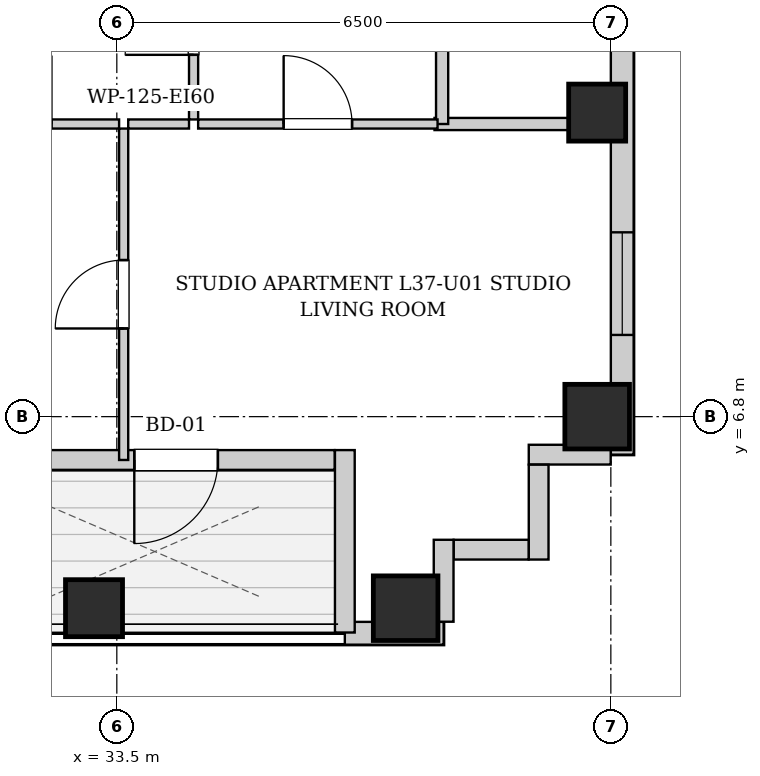
"""IFC4 building model, lengths in metres.
Left out: names, types, materials, properties, quantities, classifications, styles, units other than length and angle.
Written with IfcOpenShell. Run it as: python <this file> out.ifc"""

import sys

from ifc_helpers import new_model, si_unit, direction, frame, frame_2d, origin, origin_2d, place, context, subcontext, project, spatial, rectangle, extrude, element, fill, save


model = new_model("IFC4")
c1 = context("Model", 3, precision=1e-05, world=origin(), true_north=direction((0.0, 1.0)))
c2 = subcontext(c1, "Body", "Model", "MODEL_VIEW")
j1 = project(units=[si_unit("LENGTHUNIT", "METRE"), si_unit("PLANEANGLEUNIT", "RADIAN")], contexts=[c1])
p1 = place(None, origin())
s1 = spatial("IfcSite", under=j1, at=p1, CompositionType="ELEMENT")
p2 = place(p1, origin())
s2 = spatial("IfcBuilding", under=s1, at=p2, CompositionType="ELEMENT")
p3 = place(p2, frame((0.0, 0.0, 130.9)))
s3 = spatial("IfcBuildingStorey", under=s2, at=p3, CompositionType="ELEMENT", Elevation=130.9)
p4 = place(p3, frame((33.2, 4.28, 0.0), z_axis=(0.0, 0.0, 1.0), x_axis=(1.0, 0.0, 0.0)))
e1 = element("IfcColumn", 1, at=p4, inside=s3, PredefinedType="COLUMN", context=c2, shape_type="SweptSolid", body=[
    extrude(rectangle(XDim=0.75, YDim=0.75, at=origin_2d()), origin(), (0.0, 0.0, 1.0), 3.25),
])
for number, where, z_axis, x_axis in (
    (2, (37.3, 4.28, 0.0), (0.0, 0.0, 1.0), (1.0, 0.0, 0.0)),
    (3, (39.82, 6.8, 0.0), (0.0, 0.0, 1.0), (1.0, 0.0, 0.0)),
):
    element("IfcColumn", number, at=place(p3, frame(where, z_axis=z_axis, x_axis=x_axis)), inside=s3, PredefinedType="COLUMN", context=c2, shape_type="SweptSolid", body=[
        extrude(rectangle(XDim=0.85, YDim=0.85, at=origin_2d()), origin(), (0.0, 0.0, 1.0), 3.25),
    ])
p5 = place(p3, frame((39.82, 10.8, 0.0), z_axis=(0.0, 0.0, 1.0), x_axis=(1.0, 0.0, 0.0)))
e4 = element("IfcColumn", 4, at=p5, inside=s3, PredefinedType="COLUMN", context=c2, shape_type="SweptSolid", body=[
    extrude(rectangle(XDim=0.75, YDim=0.75, at=origin_2d()), origin(), (0.0, 0.0, 1.0), 3.25),
])
p6 = place(p3, frame((40.15, 40.8, 0.0), z_axis=(0.0, 0.0, 1.0), x_axis=(0.0, -1.0, 0.0)))
e5 = element("IfcWall", 5, at=p6, inside=s3, PredefinedType="SOLIDWALL", context=c2, shape_type="SweptSolid", body=[
    extrude(rectangle(XDim=34.5, YDim=0.3, at=frame_2d((17.25, 0.0))), origin(), (0.0, 0.0, 1.0), 2.99),
])
p7 = place(p6, frame((31.575, 0.0, 0.55)))
e6 = element("IfcOpeningElement", 6, at=p7, cuts=e5, PredefinedType="OPENING", context=c2, shape_type="SweptSolid", body=[
    extrude(rectangle(XDim=1.35, YDim=1.2, at=frame_2d((0.675, 0.6))), frame((0.0, 0.16, 0.0), z_axis=(0.0, -1.0, 0.0), x_axis=(1.0, 0.0, 0.0)), (0.0, 0.0, 1.0), 0.32),
])
p8 = place(p6, frame((3.075, 0.0, 0.55)))
e7 = element("IfcOpeningElement", 7, at=p8, cuts=e5, PredefinedType="OPENING", context=c2, shape_type="SweptSolid", body=[
    extrude(rectangle(XDim=1.35, YDim=1.2, at=frame_2d((0.675, 0.6))), frame((0.0, 0.16, 0.0), z_axis=(0.0, -1.0, 0.0), x_axis=(1.0, 0.0, 0.0)), (0.0, 0.0, 1.0), 0.32),
])
p9 = place(p6, frame((1.085, 0.0, 0.55)))
e8 = element("IfcOpeningElement", 8, at=p9, cuts=e5, PredefinedType="OPENING", context=c2, shape_type="SweptSolid", body=[
    extrude(rectangle(XDim=1.35, YDim=1.2, at=frame_2d((0.675, 0.6))), frame((0.0, 0.16, 0.0), z_axis=(0.0, -1.0, 0.0), x_axis=(1.0, 0.0, 0.0)), (0.0, 0.0, 1.0), 0.32),
])
p10 = place(p6, frame((22.8, 0.0, 0.55)))
e9 = element("IfcOpeningElement", 9, at=p10, cuts=e5, PredefinedType="OPENING", context=c2, shape_type="SweptSolid", body=[
    extrude(rectangle(XDim=1.35, YDim=1.2, at=frame_2d((0.675, 0.6))), frame((0.0, 0.16, 0.0), z_axis=(0.0, -1.0, 0.0), x_axis=(1.0, 0.0, 0.0)), (0.0, 0.0, 1.0), 0.32),
])
p11 = place(p6, frame((13.425, 0.0, 0.55)))
e10 = element("IfcOpeningElement", 10, at=p11, cuts=e5, PredefinedType="OPENING", context=c2, shape_type="SweptSolid", body=[
    extrude(rectangle(XDim=1.35, YDim=1.2, at=frame_2d((0.675, 0.6))), frame((0.0, 0.16, 0.0), z_axis=(0.0, -1.0, 0.0), x_axis=(1.0, 0.0, 0.0)), (0.0, 0.0, 1.0), 0.32),
])
p12 = place(p3, frame((37.8, 3.95, 0.0), z_axis=(0.0, 0.0, 1.0), x_axis=(-1.0, 0.0, 0.0)))
e11 = element("IfcWall", 11, at=p12, inside=s3, PredefinedType="SOLIDWALL", context=c2, shape_type="SweptSolid", body=[
    extrude(rectangle(XDim=1.3, YDim=0.3, at=frame_2d((0.65, 0.0))), origin(), (0.0, 0.0, 1.0), 2.99),
])
p13 = place(p3, frame((36.5, 3.96, 0.0), z_axis=(0.0, 0.0, 1.0), x_axis=(0.0, 1.0, 0.0)))
e12 = element("IfcWall", 12, at=p13, inside=s3, PredefinedType="SOLIDWALL", context=c2, shape_type="SweptSolid", body=[
    extrude(rectangle(XDim=2.4, YDim=0.26, at=frame_2d((1.2, 0.0))), origin(), (0.0, 0.0, 1.0), 2.99),
])
p14 = place(p3, frame((36.366, 6.23, 0.0), z_axis=(0.0, 0.0, 1.0), x_axis=(-1.0, 0.0, 0.0)))
e13 = element("IfcWall", 13, at=p14, inside=s3, PredefinedType="SOLIDWALL", context=c2, shape_type="SweptSolid", body=[
    extrude(rectangle(XDim=4.732, YDim=0.26, at=frame_2d((2.366, 0.0))), origin(), (0.0, 0.0, 1.0), 2.99),
])
p15 = place(p14, frame((1.536, 0.0, 0.0)))
e14 = element("IfcOpeningElement", 14, at=p15, cuts=e13, PredefinedType="OPENING", context=c2, shape_type="SweptSolid", body=[
    extrude(rectangle(XDim=1.1, YDim=2.0, at=frame_2d((0.55, 1.0))), frame((0.0, 0.14, 0.0), z_axis=(0.0, -1.0, 0.0), x_axis=(1.0, 0.0, 0.0)), (0.0, 0.0, 1.0), 0.28),
])
p16 = place(p3, frame((39.998, 6.3, 0.0), z_axis=(0.0, 0.0, 1.0), x_axis=(-1.0, 0.0, 0.0)))
e15 = element("IfcWall", 15, at=p16, inside=s3, PredefinedType="SOLIDWALL", context=c2, shape_type="SweptSolid", body=[
    extrude(rectangle(XDim=1.078, YDim=0.26, at=frame_2d((0.539, 0.0))), origin(), (0.0, 0.0, 1.0), 2.99),
])
p17 = place(p3, frame((39.05, 6.168, 0.0), z_axis=(0.0, 0.0, 1.0), x_axis=(0.0, -1.0, 0.0)))
e16 = element("IfcWall", 16, at=p17, inside=s3, PredefinedType="SOLIDWALL", context=c2, shape_type="SweptSolid", body=[
    extrude(rectangle(XDim=1.248, YDim=0.26, at=frame_2d((0.624, 0.0))), origin(), (0.0, 0.0, 1.0), 2.99),
])
p18 = place(p3, frame((38.918, 5.05, 0.0), z_axis=(0.0, 0.0, 1.0), x_axis=(-1.0, 0.0, 0.0)))
e17 = element("IfcWall", 17, at=p18, inside=s3, PredefinedType="SOLIDWALL", context=c2, shape_type="SweptSolid", body=[
    extrude(rectangle(XDim=0.986, YDim=0.26, at=frame_2d((0.493, 0.0))), origin(), (0.0, 0.0, 1.0), 2.99),
])
p19 = place(p3, frame((37.8, 5.18, 0.0), z_axis=(0.0, 0.0, 1.0), x_axis=(0.0, -1.0, 0.0)))
e18 = element("IfcWall", 18, at=p19, inside=s3, PredefinedType="SOLIDWALL", context=c2, shape_type="SweptSolid", body=[
    extrude(rectangle(XDim=1.078, YDim=0.26, at=frame_2d((0.539, 0.0))), origin(), (0.0, 0.0, 1.0), 2.99),
])
p20 = place(p3, frame((37.68, 10.65, 0.0), z_axis=(0.0, 0.0, 1.0), x_axis=(1.0, 0.0, 0.0)))
e19 = element("IfcWall", 19, at=p20, inside=s3, PredefinedType="PARTITIONING", context=c2, shape_type="SweptSolid", body=[
    extrude(rectangle(XDim=2.34, YDim=0.16, at=frame_2d((1.17, 0.0))), origin(), (0.0, 0.0, 1.0), 2.99),
])
p21 = place(p3, frame((37.78, 10.65, 0.0), z_axis=(0.0, 0.0, 1.0), x_axis=(0.0, 1.0, 0.0)))
e20 = element("IfcWall", 20, at=p21, inside=s3, PredefinedType="PARTITIONING", context=c2, shape_type="SweptSolid", body=[
    extrude(rectangle(XDim=2.66, YDim=0.16, at=frame_2d((1.33, 0.0))), origin(), (0.0, 0.0, 1.0), 2.99),
])
p22 = place(p3, frame((34.51, 10.71, 0.0), z_axis=(0.0, 0.0, 1.0), x_axis=(0.0, 1.0, 0.0)))
e21 = element("IfcWall", 21, at=p22, inside=s3, PredefinedType="PARTITIONING", context=c2, shape_type="SweptSolid", body=[
    extrude(rectangle(XDim=2.6, YDim=0.12, at=frame_2d((1.3, 0.0))), origin(), (0.0, 0.0, 1.0), 2.99),
])
p23 = place(p22, frame((0.85, 0.0, 0.0)))
e22 = element("IfcOpeningElement", 22, at=p23, cuts=e21, PredefinedType="OPENING", context=c2, shape_type="SweptSolid", body=[
    extrude(rectangle(XDim=0.9, YDim=2.05, at=frame_2d((0.45, 1.025))), frame((0.0, 0.07, 0.0), z_axis=(0.0, -1.0, 0.0), x_axis=(1.0, 0.0, 0.0)), (0.0, 0.0, 1.0), 0.14),
])
p24 = place(p3, frame((30.85, 10.65, 0.0), z_axis=(0.0, 0.0, 1.0), x_axis=(1.0, 0.0, 0.0)))
e23 = element("IfcWall", 23, at=p24, inside=s3, PredefinedType="PARTITIONING", context=c2, shape_type="SweptSolid", body=[
    extrude(rectangle(XDim=2.68, YDim=0.12, at=frame_2d((1.34, 0.0))), origin(), (0.0, 0.0, 1.0), 2.99),
])
p25 = place(p24, frame((0.89, 0.0, 0.0)))
e24 = element("IfcOpeningElement", 24, at=p25, cuts=e23, PredefinedType="OPENING", context=c2, shape_type="SweptSolid", body=[
    extrude(rectangle(XDim=0.9, YDim=2.05, at=frame_2d((0.45, 1.025))), frame((0.0, 0.07, 0.0), z_axis=(0.0, -1.0, 0.0), x_axis=(1.0, 0.0, 0.0)), (0.0, 0.0, 1.0), 0.14),
])
p26 = place(p3, frame((33.65, 10.65, 0.0), z_axis=(0.0, 0.0, 1.0), x_axis=(1.0, 0.0, 0.0)))
e25 = element("IfcWall", 25, at=p26, inside=s3, PredefinedType="PARTITIONING", context=c2, shape_type="SweptSolid", body=[
    extrude(rectangle(XDim=0.8, YDim=0.12, at=frame_2d((0.4, 0.0))), origin(), (0.0, 0.0, 1.0), 2.99),
])
p27 = place(p3, frame((34.57, 10.65, 0.0), z_axis=(0.0, 0.0, 1.0), x_axis=(1.0, 0.0, 0.0)))
e26 = element("IfcWall", 26, at=p27, inside=s3, PredefinedType="PARTITIONING", context=c2, shape_type="SweptSolid", body=[
    extrude(rectangle(XDim=3.15, YDim=0.12, at=frame_2d((1.575, 0.0))), origin(), (0.0, 0.0, 1.0), 2.99),
])
p28 = place(p27, frame((1.125, 0.0, 0.0)))
e27 = element("IfcOpeningElement", 27, at=p28, cuts=e26, PredefinedType="OPENING", context=c2, shape_type="SweptSolid", body=[
    extrude(rectangle(XDim=0.9, YDim=2.05, at=frame_2d((0.45, 1.025))), frame((0.0, 0.07, 0.0), z_axis=(0.0, -1.0, 0.0), x_axis=(1.0, 0.0, 0.0)), (0.0, 0.0, 1.0), 0.14),
])
p29 = place(p3, frame((33.59, 6.23, 0.0), z_axis=(0.0, 0.0, 1.0), x_axis=(0.0, 1.0, 0.0)))
e28 = element("IfcWall", 28, at=p29, inside=s3, PredefinedType="PARTITIONING", context=c2, shape_type="SweptSolid", body=[
    extrude(rectangle(XDim=4.36, YDim=0.12, at=frame_2d((2.18, 0.0))), origin(), (0.0, 0.0, 1.0), 2.99),
])
p30 = place(p29, frame((1.73, 0.0, 0.0)))
e29 = element("IfcOpeningElement", 29, at=p30, cuts=e28, PredefinedType="OPENING", context=c2, shape_type="SweptSolid", body=[
    extrude(rectangle(XDim=0.9, YDim=2.05, at=frame_2d((0.45, 1.025))), frame((0.0, 0.07, 0.0), z_axis=(0.0, -1.0, 0.0), x_axis=(1.0, 0.0, 0.0)), (0.0, 0.0, 1.0), 0.14),
])
p31 = place(p23, origin())
e30 = element("IfcDoor", 30, at=p31, inside=s3, OperationType="SINGLE_SWING_LEFT", PredefinedType="DOOR", context=c2, shape_type="SweptSolid", body=[
    extrude(rectangle(XDim=0.9, YDim=2.05, at=frame_2d((0.45, 1.025))), frame((0.0, 0.025, 0.0), z_axis=(0.0, -1.0, 0.0), x_axis=(1.0, 0.0, 0.0)), (0.0, 0.0, 1.0), 0.05),
])
fill(e22, e30)
p32 = place(p28, origin())
e31 = element("IfcDoor", 31, at=p32, inside=s3, OperationType="SINGLE_SWING_LEFT", PredefinedType="DOOR", context=c2, shape_type="SweptSolid", body=[
    extrude(rectangle(XDim=0.9, YDim=2.05, at=frame_2d((0.45, 1.025))), frame((0.0, 0.025, 0.0), z_axis=(0.0, -1.0, 0.0), x_axis=(1.0, 0.0, 0.0)), (0.0, 0.0, 1.0), 0.05),
])
fill(e27, e31)
p33 = place(p30, origin())
e32 = element("IfcDoor", 32, at=p33, inside=s3, OperationType="SINGLE_SWING_LEFT", PredefinedType="DOOR", context=c2, shape_type="SweptSolid", body=[
    extrude(rectangle(XDim=0.9, YDim=2.05, at=frame_2d((0.45, 1.025))), frame((0.0, 0.025, 0.0), z_axis=(0.0, -1.0, 0.0), x_axis=(1.0, 0.0, 0.0)), (0.0, 0.0, 1.0), 0.05),
])
fill(e29, e32)
p34 = place(p15, origin())
e33 = element("IfcDoor", 33, at=p34, inside=s3, OperationType="SINGLE_SWING_RIGHT", PredefinedType="DOOR", context=c2, shape_type="SweptSolid", body=[
    extrude(rectangle(XDim=1.1, YDim=2.0, at=frame_2d((0.55, 1.0))), frame((0.0, 0.025, 0.0), z_axis=(0.0, -1.0, 0.0), x_axis=(1.0, 0.0, 0.0)), (0.0, 0.0, 1.0), 0.05),
])
fill(e14, e33)
p35 = place(p7, origin())
e34 = element("IfcWindow", 34, at=p35, inside=s3, PartitioningType="SINGLE_PANEL", PredefinedType="WINDOW", context=c2, shape_type="SweptSolid", body=[
    extrude(rectangle(XDim=1.35, YDim=1.2, at=frame_2d((0.675, 0.6))), frame((0.0, 0.03, 0.0), z_axis=(0.0, -1.0, 0.0), x_axis=(1.0, 0.0, 0.0)), (0.0, 0.0, 1.0), 0.06),
])
fill(e6, e34)
save(model, sys.argv[1])
